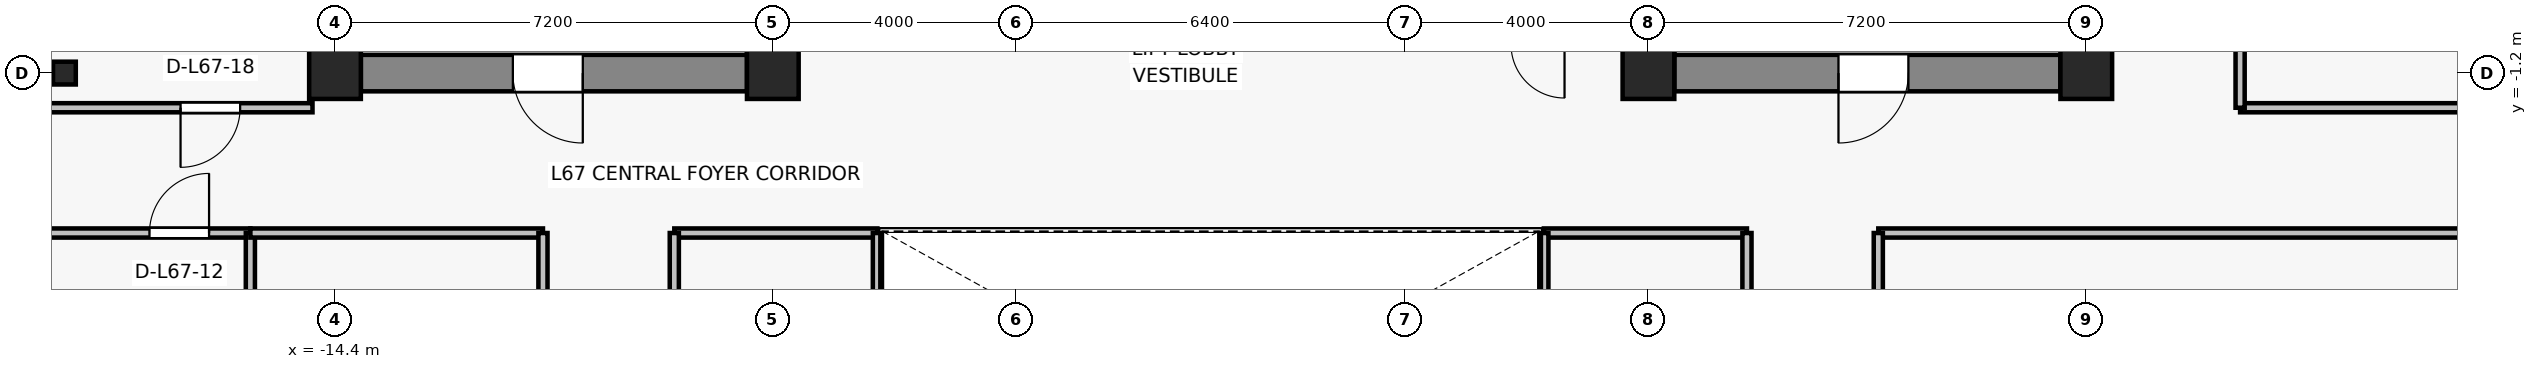
"""IFC4 building model, lengths in metres.
Left out: names, types, materials, properties, quantities, classifications, styles, units other than length and angle.
Written with IfcOpenShell. Run it as: python <this file> out.ifc"""

import sys

from ifc_helpers import new_model, si_unit, direction, frame, frame_2d, origin, origin_2d, place, context, subcontext, project, spatial, rectangle, i_section, extrude, source, transform, mapped, element, fill, save


model = new_model("IFC4")
c1 = context("Model", 3, precision=1e-05, world=origin(), true_north=direction((0.0, 1.0)))
c2 = subcontext(c1, "Body", "Model", "MODEL_VIEW")
j1 = project(units=[si_unit("LENGTHUNIT", "METRE"), si_unit("PLANEANGLEUNIT", "RADIAN")], contexts=[c1])
p1 = place(None, origin())
s1 = spatial("IfcSite", under=j1, at=p1, CompositionType="ELEMENT")
p2 = place(p1, origin())
s2 = spatial("IfcBuilding", under=s1, at=p2, CompositionType="ELEMENT")
p3 = place(p2, frame((0.0, 0.0, 238.6)))
s3 = spatial("IfcBuildingStorey", under=s2, at=p3, CompositionType="ELEMENT", Elevation=238.6)
for number, where, z_axis, x_axis in (
    (1, (-14.4, -1.2, 0.0), (0.0, 0.0, 1.0), (1.0, 0.0, 0.0)),
    (2, (-7.2, -1.2, 0.0), (0.0, 0.0, 1.0), (1.0, 0.0, 0.0)),
    (3, (7.2, -1.2, 0.0), (0.0, 0.0, 1.0), (1.0, 0.0, 0.0)),
    (4, (14.4, -1.2, 0.0), (0.0, 0.0, 1.0), (1.0, 0.0, 0.0)),
):
    element("IfcColumn", number, at=place(p3, frame(where, z_axis=z_axis, x_axis=x_axis)), inside=s3, PredefinedType="COLUMN", context=c2, shape_type="SweptSolid", body=[
        extrude(rectangle(XDim=0.85, YDim=0.85, at=origin_2d()), origin(), (0.0, 0.0, 1.0), 3.3),
    ])
p4 = place(p3, frame((-18.85, -1.2, 0.0), z_axis=(0.0, 0.0, 1.0), x_axis=(1.0, 0.0, 0.0)))
e5 = element("IfcColumn", 5, at=p4, inside=s3, PredefinedType="COLUMN", context=c2, shape_type="SweptSolid", body=[
    extrude(i_section(OverallWidth=0.375, OverallDepth=0.375, WebThickness=0.017, FlangeThickness=0.027, FilletRadius=0.015, at=origin_2d()), origin(), (0.0, 0.0, 1.0), 3.3),
])
p5 = place(p3, frame((-7.625, -1.2, 0.0), z_axis=(0.0, 0.0, 1.0), x_axis=(-1.0, 0.0, 0.0)))
e6 = element("IfcWall", 6, at=p5, inside=s3, PredefinedType="SHEAR", context=c2, shape_type="SweptSolid", body=[
    extrude(rectangle(XDim=6.35, YDim=0.6, at=frame_2d((3.175, 0.0))), origin(), (0.0, 0.0, 1.0), 3.075),
])
p6 = place(p5, frame((2.7, 0.0, 0.0)))
e7 = element("IfcOpeningElement", 7, at=p6, cuts=e6, PredefinedType="OPENING", context=c2, shape_type="SweptSolid", body=[
    extrude(rectangle(XDim=1.15, YDim=2.15, at=frame_2d((0.575, 1.075))), frame((0.0, 0.31, 0.0), z_axis=(0.0, -1.0, 0.0), x_axis=(1.0, 0.0, 0.0)), (0.0, 0.0, 1.0), 0.62),
])
p7 = place(p3, frame((13.975, -1.2, 0.0), z_axis=(0.0, 0.0, 1.0), x_axis=(-1.0, 0.0, 0.0)))
e8 = element("IfcWall", 8, at=p7, inside=s3, PredefinedType="SHEAR", context=c2, shape_type="SweptSolid", body=[
    extrude(rectangle(XDim=6.35, YDim=0.6, at=frame_2d((3.175, 0.0))), origin(), (0.0, 0.0, 1.0), 3.075),
])
p8 = place(p7, frame((2.5, 0.0, 0.0)))
e9 = element("IfcOpeningElement", 9, at=p8, cuts=e8, PredefinedType="OPENING", context=c2, shape_type="SweptSolid", body=[
    extrude(rectangle(XDim=1.15, YDim=2.15, at=frame_2d((0.575, 1.075))), frame((0.0, 0.31, 0.0), z_axis=(0.0, -1.0, 0.0), x_axis=(1.0, 0.0, 0.0)), (0.0, 0.0, 1.0), 0.62),
])
for number, where, z_axis, x_axis in (
    (10, (-7.4, -0.9, 0.0), (0.0, 0.0, 1.0), (0.0, 1.0, 0.0)),
    (11, (7.4, -0.9, 0.0), (0.0, 0.0, 1.0), (0.0, 1.0, 0.0)),
):
    element("IfcWall", number, at=place(p3, frame(where, z_axis=z_axis, x_axis=x_axis)), inside=s3, PredefinedType="SHEAR", context=c2, shape_type="SweptSolid", body=[
        extrude(rectangle(XDim=4.15, YDim=0.45, at=frame_2d((2.075, 0.0))), origin(), (0.0, 0.0, 1.0), 3.075),
    ])
p9 = place(p3, frame((-19.53, -3.83, 0.0), z_axis=(0.0, 0.0, 1.0), x_axis=(1.0, 0.0, 0.0)))
e12 = element("IfcWall", 12, at=p9, inside=s3, PredefinedType="PARTITIONING", context=c2, shape_type="SweptSolid", body=[
    extrude(rectangle(XDim=3.738, YDim=0.15, at=frame_2d((1.869, 0.0))), origin(), (0.0, 0.0, 1.0), 2.765),
])
p10 = place(p9, frame((2.079, 0.0, 0.0)))
e13 = element("IfcOpeningElement", 13, at=p10, cuts=e12, PredefinedType="OPENING", context=c2, shape_type="SweptSolid", body=[
    extrude(rectangle(XDim=0.98, YDim=2.15, at=frame_2d((0.49, 1.075))), frame((0.0, 0.085, 0.0), z_axis=(0.0, -1.0, 0.0), x_axis=(1.0, 0.0, 0.0)), (0.0, 0.0, 1.0), 0.17),
])
p11 = place(p3, frame((-15.792, -3.83, 0.0), z_axis=(0.0, 0.0, 1.0), x_axis=(0.0, -1.0, 0.0)))
e14 = element("IfcWall", 14, at=p11, inside=s3, PredefinedType="PARTITIONING", context=c2, shape_type="SweptSolid", body=[
    extrude(rectangle(XDim=13.2, YDim=0.15, at=frame_2d((6.6, 0.0))), origin(), (0.0, 0.0, 1.0), 2.615),
])
p12 = place(p3, frame((-15.792, -3.83, 0.0), z_axis=(0.0, 0.0, 1.0), x_axis=(1.0, 0.0, 0.0)))
e15 = element("IfcWall", 15, at=p12, inside=s3, PredefinedType="PARTITIONING", context=c2, shape_type="SweptSolid", body=[
    extrude(rectangle(XDim=4.812, YDim=0.15, at=frame_2d((2.406, 0.0))), origin(), (0.0, 0.0, 1.0), 2.615),
])
p13 = place(p3, frame((-10.98, -3.83, 0.0), z_axis=(0.0, 0.0, 1.0), x_axis=(0.0, -1.0, 0.0)))
e16 = element("IfcWall", 16, at=p13, inside=s3, PredefinedType="PARTITIONING", context=c2, shape_type="SweptSolid", body=[
    extrude(rectangle(XDim=13.2, YDim=0.15, at=frame_2d((6.6, 0.0))), origin(), (0.0, 0.0, 1.0), 2.615),
])
p14 = place(p13, frame((2.88, 0.0, 0.0)))
e17 = element("IfcOpeningElement", 17, at=p14, cuts=e16, PredefinedType="OPENING", context=c2, shape_type="SweptSolid", body=[
    extrude(rectangle(XDim=0.98, YDim=2.15, at=frame_2d((0.49, 1.075))), frame((0.0, 0.085, 0.0), z_axis=(0.0, -1.0, 0.0), x_axis=(1.0, 0.0, 0.0)), (0.0, 0.0, 1.0), 0.17),
])
p15 = place(p3, frame((10.98, -3.83, 0.0), z_axis=(0.0, 0.0, 1.0), x_axis=(1.0, 0.0, 0.0)))
e18 = element("IfcWall", 18, at=p15, inside=s3, PredefinedType="PARTITIONING", context=c2, shape_type="SweptSolid", body=[
    extrude(rectangle(XDim=12.55, YDim=0.15, at=frame_2d((6.275, 0.0))), origin(), (0.0, 0.0, 1.0), 2.615),
])
p16 = place(p3, frame((10.98, -17.03, 0.0), z_axis=(0.0, 0.0, 1.0), x_axis=(0.0, 1.0, 0.0)))
e19 = element("IfcWall", 19, at=p16, inside=s3, PredefinedType="PARTITIONING", context=c2, shape_type="SweptSolid", body=[
    extrude(rectangle(XDim=13.2, YDim=0.15, at=frame_2d((6.6, 0.0))), origin(), (0.0, 0.0, 1.0), 2.615),
])
p17 = place(p16, frame((9.34, 0.0, 0.0)))
e20 = element("IfcOpeningElement", 20, at=p17, cuts=e19, PredefinedType="OPENING", context=c2, shape_type="SweptSolid", body=[
    extrude(rectangle(XDim=0.98, YDim=2.15, at=frame_2d((0.49, 1.075))), frame((0.0, 0.085, 0.0), z_axis=(0.0, -1.0, 0.0), x_axis=(1.0, 0.0, 0.0)), (0.0, 0.0, 1.0), 0.17),
])
p18 = place(p3, frame((-8.82, -3.83, 0.0), z_axis=(0.0, 0.0, 1.0), x_axis=(1.0, 0.0, 0.0)))
e21 = element("IfcWall", 21, at=p18, inside=s3, PredefinedType="PARTITIONING", context=c2, shape_type="SweptSolid", body=[
    extrude(rectangle(XDim=3.34, YDim=0.15, at=frame_2d((1.67, 0.0))), origin(), (0.0, 0.0, 1.0), 2.615),
])
p19 = place(p3, frame((-8.82, -17.03, 0.0), z_axis=(0.0, 0.0, 1.0), x_axis=(0.0, 1.0, 0.0)))
e22 = element("IfcWall", 22, at=p19, inside=s3, PredefinedType="PARTITIONING", context=c2, shape_type="SweptSolid", body=[
    extrude(rectangle(XDim=13.2, YDim=0.15, at=frame_2d((6.6, 0.0))), origin(), (0.0, 0.0, 1.0), 2.615),
])
p20 = place(p19, frame((9.385, 0.0, 0.0)))
e23 = element("IfcOpeningElement", 23, at=p20, cuts=e22, PredefinedType="OPENING", context=c2, shape_type="SweptSolid", body=[
    extrude(rectangle(XDim=0.98, YDim=2.15, at=frame_2d((0.49, 1.075))), frame((0.0, 0.085, 0.0), z_axis=(0.0, -1.0, 0.0), x_axis=(1.0, 0.0, 0.0)), (0.0, 0.0, 1.0), 0.17),
])
p21 = place(p3, frame((-5.48, -3.83, 0.0), z_axis=(0.0, 0.0, 1.0), x_axis=(0.0, -1.0, 0.0)))
e24 = element("IfcWall", 24, at=p21, inside=s3, PredefinedType="PARTITIONING", context=c2, shape_type="SweptSolid", body=[
    extrude(rectangle(XDim=13.2, YDim=0.15, at=frame_2d((6.6, 0.0))), origin(), (0.0, 0.0, 1.0), 2.615),
])
p22 = place(p21, frame((7.22, 0.0, 0.0)))
e25 = element("IfcOpeningElement", 25, at=p22, cuts=e24, PredefinedType="OPENING", context=c2, shape_type="SweptSolid", body=[
    extrude(rectangle(XDim=0.98, YDim=2.15, at=frame_2d((0.49, 1.075))), frame((0.0, 0.085, 0.0), z_axis=(0.0, -1.0, 0.0), x_axis=(1.0, 0.0, 0.0)), (0.0, 0.0, 1.0), 0.17),
])
p23 = place(p3, frame((5.48, -3.83, 0.0), z_axis=(0.0, 0.0, 1.0), x_axis=(1.0, 0.0, 0.0)))
e26 = element("IfcWall", 26, at=p23, inside=s3, PredefinedType="PARTITIONING", context=c2, shape_type="SweptSolid", body=[
    extrude(rectangle(XDim=3.34, YDim=0.15, at=frame_2d((1.67, 0.0))), origin(), (0.0, 0.0, 1.0), 2.615),
])
p24 = place(p3, frame((5.48, -17.03, 0.0), z_axis=(0.0, 0.0, 1.0), x_axis=(0.0, 1.0, 0.0)))
e27 = element("IfcWall", 27, at=p24, inside=s3, PredefinedType="PARTITIONING", context=c2, shape_type="SweptSolid", body=[
    extrude(rectangle(XDim=13.2, YDim=0.15, at=frame_2d((6.6, 0.0))), origin(), (0.0, 0.0, 1.0), 2.615),
])
p25 = place(p3, frame((8.82, -3.83, 0.0), z_axis=(0.0, 0.0, 1.0), x_axis=(0.0, -1.0, 0.0)))
e28 = element("IfcWall", 28, at=p25, inside=s3, PredefinedType="PARTITIONING", context=c2, shape_type="SweptSolid", body=[
    extrude(rectangle(XDim=13.2, YDim=0.15, at=frame_2d((6.6, 0.0))), origin(), (0.0, 0.0, 1.0), 2.615),
])
p26 = place(p25, frame((2.835, 0.0, 0.0)))
e29 = element("IfcOpeningElement", 29, at=p26, cuts=e28, PredefinedType="OPENING", context=c2, shape_type="SweptSolid", body=[
    extrude(rectangle(XDim=0.98, YDim=2.15, at=frame_2d((0.49, 1.075))), frame((0.0, 0.085, 0.0), z_axis=(0.0, -1.0, 0.0), x_axis=(1.0, 0.0, 0.0)), (0.0, 0.0, 1.0), 0.17),
])
p27 = place(p3, frame((-14.77, -1.77, 0.0), z_axis=(0.0, 0.0, 1.0), x_axis=(-1.0, 0.0, 0.0)))
e30 = element("IfcWall", 30, at=p27, inside=s3, PredefinedType="PARTITIONING", context=c2, shape_type="SweptSolid", body=[
    extrude(rectangle(XDim=4.76, YDim=0.15, at=frame_2d((2.38, 0.0))), origin(), (0.0, 0.0, 1.0), 2.765),
])
p28 = place(p27, frame((1.19, 0.0, 0.0)))
e31 = element("IfcOpeningElement", 31, at=p28, cuts=e30, PredefinedType="OPENING", context=c2, shape_type="SweptSolid", body=[
    extrude(rectangle(XDim=0.98, YDim=2.15, at=frame_2d((0.49, 1.075))), frame((0.0, 0.085, 0.0), z_axis=(0.0, -1.0, 0.0), x_axis=(1.0, 0.0, 0.0)), (0.0, 0.0, 1.0), 0.17),
])
p29 = place(p3, frame((23.53, -1.77, 0.0), z_axis=(0.0, 0.0, 1.0), x_axis=(-1.0, 0.0, 0.0)))
e32 = element("IfcWall", 32, at=p29, inside=s3, PredefinedType="PARTITIONING", context=c2, shape_type="SweptSolid", body=[
    extrude(rectangle(XDim=6.6, YDim=0.15, at=frame_2d((3.3, 0.0))), origin(), (0.0, 0.0, 1.0), 2.765),
])
p30 = place(p3, frame((16.93, -1.77, 0.0), z_axis=(0.0, 0.0, 1.0), x_axis=(0.0, 1.0, 0.0)))
e33 = element("IfcWall", 33, at=p30, inside=s3, PredefinedType="PARTITIONING", context=c2, shape_type="SweptSolid", body=[
    extrude(rectangle(XDim=15.65, YDim=0.15, at=frame_2d((7.825, 0.0))), origin(), (0.0, 0.0, 1.0), 2.615),
])
p31 = place(p30, frame((7.335, 0.0, 0.0)))
e34 = element("IfcOpeningElement", 34, at=p31, cuts=e33, PredefinedType="OPENING", context=c2, shape_type="SweptSolid", body=[
    extrude(rectangle(XDim=0.98, YDim=2.15, at=frame_2d((0.49, 1.075))), frame((0.0, 0.085, 0.0), z_axis=(0.0, -1.0, 0.0), x_axis=(1.0, 0.0, 0.0)), (0.0, 0.0, 1.0), 0.17),
])
m1 = source(origin(), c2, "Body", "SweptSolid", [
    extrude(rectangle(XDim=1.15, YDim=2.15, at=frame_2d((0.575, 1.075))), frame((0.0, 0.025, 0.0), z_axis=(0.0, -1.0, 0.0), x_axis=(1.0, 0.0, 0.0)), (0.0, 0.0, 1.0), 0.05),
])
p32 = place(p6, origin())
e35 = element("IfcDoor", 35, at=p32, inside=s3, OperationType="SINGLE_SWING_LEFT", PredefinedType="DOOR", context=c2, shape_type="MappedRepresentation", body=[
    mapped(m1, transform((0.0, 0.0, 0.0), x_axis=(1.0, 0.0, 0.0), y_axis=(0.0, 1.0, 0.0), z_axis=(0.0, 0.0, 1.0), scale=1.0)),
])
fill(e7, e35)
p33 = place(p8, origin())
e36 = element("IfcDoor", 36, at=p33, inside=s3, OperationType="SINGLE_SWING_RIGHT", PredefinedType="DOOR", context=c2, shape_type="MappedRepresentation", body=[
    mapped(m1, transform((0.0, 0.0, 0.0), x_axis=(1.0, 0.0, 0.0), y_axis=(0.0, 1.0, 0.0), z_axis=(0.0, 0.0, 1.0), scale=1.0)),
])
fill(e9, e36)
m2 = source(origin(), c2, "Body", "SweptSolid", [
    extrude(rectangle(XDim=0.98, YDim=2.15, at=frame_2d((0.49, 1.075))), frame((0.0, 0.025, 0.0), z_axis=(0.0, -1.0, 0.0), x_axis=(1.0, 0.0, 0.0)), (0.0, 0.0, 1.0), 0.05),
])
p34 = place(p10, origin())
e37 = element("IfcDoor", 37, at=p34, inside=s3, OperationType="SINGLE_SWING_RIGHT", PredefinedType="DOOR", context=c2, shape_type="MappedRepresentation", body=[
    mapped(m2, transform((0.0, 0.0, 0.0), x_axis=(1.0, 0.0, 0.0), y_axis=(0.0, 1.0, 0.0), z_axis=(0.0, 0.0, 1.0), scale=1.0)),
])
fill(e13, e37)
p35 = place(p28, origin())
e38 = element("IfcDoor", 38, at=p35, inside=s3, OperationType="SINGLE_SWING_RIGHT", PredefinedType="DOOR", context=c2, shape_type="MappedRepresentation", body=[
    mapped(m2, transform((0.0, 0.0, 0.0), x_axis=(1.0, 0.0, 0.0), y_axis=(0.0, 1.0, 0.0), z_axis=(0.0, 0.0, 1.0), scale=1.0)),
])
fill(e31, e38)
save(model, sys.argv[1])
